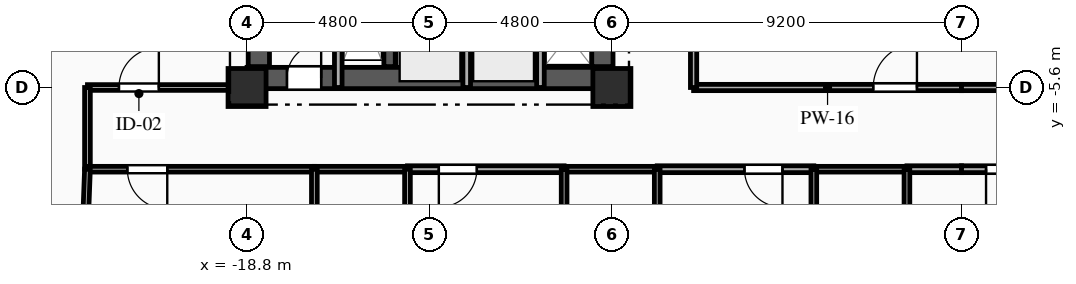
"""IFC4 building model, lengths in metres.
Left out: names, types, materials, properties, quantities, classifications, styles, units other than length and angle.
Written with IfcOpenShell. Run it as: python <this file> out.ifc"""

import sys

from ifc_helpers import new_model, si_unit, direction, frame, frame_2d, origin, origin_2d, place, context, subcontext, project, spatial, rectangle, extrude, element, fill, save


model = new_model("IFC4")
c1 = context("Model", 3, precision=1e-05, world=origin(), true_north=direction((0.0, 1.0)))
c2 = subcontext(c1, "Body", "Model", "MODEL_VIEW")
j1 = project(units=[si_unit("LENGTHUNIT", "METRE"), si_unit("PLANEANGLEUNIT", "RADIAN")], contexts=[c1])
p1 = place(None, origin())
s1 = spatial("IfcSite", under=j1, at=p1, CompositionType="ELEMENT")
p2 = place(p1, origin())
s2 = spatial("IfcBuilding", under=s1, at=p2, CompositionType="ELEMENT")
p3 = place(p2, frame((0.0, 0.0, 122.55)))
s3 = spatial("IfcBuildingStorey", under=s2, at=p3, CompositionType="ELEMENT", Elevation=122.55)
for number, where, z_axis, x_axis in (
    (1, (-18.8, -5.6, 0.0), (0.0, 0.0, 1.0), (1.0, 0.0, 0.0)),
    (2, (-9.2, -5.6, 0.0), (0.0, 0.0, 1.0), (1.0, 0.0, 0.0)),
):
    element("IfcColumn", number, at=place(p3, frame(where, z_axis=z_axis, x_axis=x_axis)), inside=s3, PredefinedType="COLUMN", context=c2, shape_type="SweptSolid", body=[
        extrude(rectangle(XDim=1.0, YDim=1.0, at=origin_2d()), origin(), (0.0, 0.0, 1.0), 3.35),
    ])
p4 = place(p3, frame((-18.8, -5.35, 0.0), z_axis=(0.0, 0.0, 1.0), x_axis=(1.0, 0.0, 0.0)))
e3 = element("IfcWall", 3, at=p4, inside=s3, PredefinedType="SHEAR", context=c2, shape_type="SweptSolid", body=[
    extrude(rectangle(XDim=9.6, YDim=0.56, at=frame_2d((4.8, 0.0))), origin(), (0.0, 0.0, 1.0), 3.0),
])
p5 = place(p4, frame((1.05, 0.0, 0.0)))
e4 = element("IfcOpeningElement", 4, at=p5, cuts=e3, PredefinedType="OPENING", context=c2, shape_type="SweptSolid", body=[
    extrude(rectangle(XDim=0.9, YDim=2.1, at=frame_2d((0.45, 1.05))), frame((0.0, 0.29, 0.0), z_axis=(0.0, -1.0, 0.0), x_axis=(1.0, 0.0, 0.0)), (0.0, 0.0, 1.0), 0.58),
])
p6 = place(p3, frame((-18.49, -5.05, 0.0), z_axis=(0.0, 0.0, 1.0), x_axis=(0.0, 1.0, 0.0)))
e5 = element("IfcWall", 5, at=p6, inside=s3, PredefinedType="SHEAR", context=c2, shape_type="SweptSolid", body=[
    extrude(rectangle(XDim=10.1, YDim=0.56, at=frame_2d((5.05, 0.0))), origin(), (0.0, 0.0, 1.0), 3.0),
])
p7 = place(p3, frame((-9.45, -5.05, 0.0), z_axis=(0.0, 0.0, 1.0), x_axis=(0.0, 1.0, 0.0)))
e6 = element("IfcWall", 6, at=p7, inside=s3, PredefinedType="SHEAR", context=c2, shape_type="SweptSolid", body=[
    extrude(rectangle(XDim=10.1, YDim=0.56, at=frame_2d((5.05, 0.0))), origin(), (0.0, 0.0, 1.0), 3.0),
])
p8 = place(p7, frame((7.175, 0.0, 0.0)))
e7 = element("IfcOpeningElement", 7, at=p8, cuts=e6, PredefinedType="OPENING", context=c2, shape_type="SweptSolid", body=[
    extrude(rectangle(XDim=0.9, YDim=2.1, at=frame_2d((0.45, 1.05))), frame((0.0, 0.29, 0.0), z_axis=(0.0, -1.0, 0.0), x_axis=(1.0, 0.0, 0.0)), (0.0, 0.0, 1.0), 0.58),
])
p9 = place(p7, frame((2.4, 0.0, 0.0)))
e8 = element("IfcOpeningElement", 8, at=p9, cuts=e6, PredefinedType="OPENING", context=c2, shape_type="SweptSolid", body=[
    extrude(rectangle(XDim=1.2, YDim=2.15, at=frame_2d((0.6, 1.075))), frame((0.0, 0.29, 0.0), z_axis=(0.0, -1.0, 0.0), x_axis=(1.0, 0.0, 0.0)), (0.0, 0.0, 1.0), 0.58),
])
p10 = place(p3, frame((-15.05, -5.05, 0.0), z_axis=(0.0, 0.0, 1.0), x_axis=(0.0, 1.0, 0.0)))
e9 = element("IfcWall", 9, at=p10, inside=s3, PredefinedType="SHEAR", context=c2, shape_type="SweptSolid", body=[
    extrude(rectangle(XDim=10.1, YDim=0.3, at=frame_2d((5.05, 0.0))), origin(), (0.0, 0.0, 1.0), 3.0),
])
p11 = place(p3, frame((-16.4, -5.6, 0.0), z_axis=(0.0, 0.0, 1.0), x_axis=(0.0, 1.0, 0.0)))
e10 = element("IfcWall", 10, at=p11, inside=s3, PredefinedType="PARTITIONING", context=c2, shape_type="SweptSolid", body=[
    extrude(rectangle(XDim=3.49, YDim=0.2, at=frame_2d((1.745, 0.0))), origin(), (0.0, 0.0, 1.0), 3.0),
])
for number, where, z_axis, x_axis in (
    (11, (-13.02, -5.6, 0.0), (0.0, 0.0, 1.0), (0.0, 1.0, 0.0)),
    (12, (-11.08, -5.6, 0.0), (0.0, 0.0, 1.0), (0.0, 1.0, 0.0)),
):
    element("IfcWall", number, at=place(p3, frame(where, z_axis=z_axis, x_axis=x_axis)), inside=s3, PredefinedType="PARTITIONING", context=c2, shape_type="SweptSolid", body=[
        extrude(rectangle(XDim=2.25, YDim=0.2, at=frame_2d((1.125, 0.0))), origin(), (0.0, 0.0, 1.0), 3.0),
    ])
p12 = place(p3, frame((-23.0, -5.6, 0.0), z_axis=(0.0, 0.0, 1.0), x_axis=(1.0, 0.0, 0.0)))
e13 = element("IfcWall", 13, at=p12, inside=s3, PredefinedType="PARTITIONING", context=c2, shape_type="SweptSolid", body=[
    extrude(rectangle(XDim=4.2, YDim=0.15, at=frame_2d((2.1, 0.0))), origin(), (0.0, 0.0, 1.0), 3.0),
])
p13 = place(p12, frame((0.829, 0.0, 0.0)))
e14 = element("IfcOpeningElement", 14, at=p13, cuts=e13, PredefinedType="OPENING", context=c2, shape_type="SweptSolid", body=[
    extrude(rectangle(XDim=1.05, YDim=2.15, at=frame_2d((0.525, 1.075))), frame((0.0, 0.085, 0.0), z_axis=(0.0, -1.0, 0.0), x_axis=(1.0, 0.0, 0.0)), (0.0, 0.0, 1.0), 0.17),
])
p14 = place(p3, frame((-23.0, -7.75, 0.0), z_axis=(0.0, 0.0, 1.0), x_axis=(0.0, 1.0, 0.0)))
e15 = element("IfcWall", 15, at=p14, inside=s3, PredefinedType="PARTITIONING", context=c2, shape_type="SweptSolid", body=[
    extrude(rectangle(XDim=2.15, YDim=0.15, at=frame_2d((1.075, 0.0))), origin(), (0.0, 0.0, 1.0), 2.655),
])
p15 = place(p3, frame((-17.029, -7.75, 0.0), z_axis=(0.0, 0.0, 1.0), x_axis=(-1.0, 0.0, 0.0)))
e16 = element("IfcWall", 16, at=p15, inside=s3, PredefinedType="PARTITIONING", context=c2, shape_type="SweptSolid", body=[
    extrude(rectangle(XDim=5.971, YDim=0.15, at=frame_2d((2.985, 0.0))), origin(), (0.0, 0.0, 1.0), 3.0),
])
p16 = place(p15, frame((3.871, 0.0, 0.0)))
e17 = element("IfcOpeningElement", 17, at=p16, cuts=e16, PredefinedType="OPENING", context=c2, shape_type="SweptSolid", body=[
    extrude(rectangle(XDim=1.05, YDim=2.15, at=frame_2d((0.525, 1.075))), frame((0.0, 0.085, 0.0), z_axis=(0.0, -1.0, 0.0), x_axis=(1.0, 0.0, 0.0)), (0.0, 0.0, 1.0), 0.17),
])
p17 = place(p3, frame((-10.457, -7.75, 0.0), z_axis=(0.0, 0.0, 1.0), x_axis=(-1.0, 0.0, 0.0)))
e18 = element("IfcWall", 18, at=p17, inside=s3, PredefinedType="PARTITIONING", context=c2, shape_type="SweptSolid", body=[
    extrude(rectangle(XDim=4.122, YDim=0.18, at=frame_2d((2.061, 0.0))), origin(), (0.0, 0.0, 1.0), 3.0),
])
p18 = place(p17, frame((2.297, 0.0, 0.0)))
e19 = element("IfcOpeningElement", 19, at=p18, cuts=e18, PredefinedType="OPENING", context=c2, shape_type="SweptSolid", body=[
    extrude(rectangle(XDim=1.0, YDim=2.15, at=frame_2d((0.5, 1.075))), frame((0.0, 0.1, 0.0), z_axis=(0.0, -1.0, 0.0), x_axis=(1.0, 0.0, 0.0)), (0.0, 0.0, 1.0), 0.2),
])
p19 = place(p3, frame((-14.579, -7.75, 0.0), z_axis=(0.0, 0.0, 1.0), x_axis=(-1.0, 0.0, 0.0)))
e20 = element("IfcWall", 20, at=p19, inside=s3, PredefinedType="PLUMBINGWALL", context=c2, shape_type="SweptSolid", body=[
    extrude(rectangle(XDim=2.45, YDim=0.15, at=frame_2d((1.225, 0.0))), origin(), (0.0, 0.0, 1.0), 3.0),
])
p20 = place(p3, frame((-3.886, -7.75, 0.0), z_axis=(0.0, 0.0, 1.0), x_axis=(-1.0, 0.0, 0.0)))
e21 = element("IfcWall", 21, at=p20, inside=s3, PredefinedType="PARTITIONING", context=c2, shape_type="SweptSolid", body=[
    extrude(rectangle(XDim=4.121, YDim=0.18, at=frame_2d((2.061, 0.0))), origin(), (0.0, 0.0, 1.0), 3.0),
])
p21 = place(p20, frame((0.825, 0.0, 0.0)))
e22 = element("IfcOpeningElement", 22, at=p21, cuts=e21, PredefinedType="OPENING", context=c2, shape_type="SweptSolid", body=[
    extrude(rectangle(XDim=1.0, YDim=2.15, at=frame_2d((0.5, 1.075))), frame((0.0, 0.1, 0.0), z_axis=(0.0, -1.0, 0.0), x_axis=(1.0, 0.0, 0.0)), (0.0, 0.0, 1.0), 0.2),
])
p22 = place(p3, frame((-8.007, -7.75, 0.0), z_axis=(0.0, 0.0, 1.0), x_axis=(-1.0, 0.0, 0.0)))
e23 = element("IfcWall", 23, at=p22, inside=s3, PredefinedType="PLUMBINGWALL", context=c2, shape_type="SweptSolid", body=[
    extrude(rectangle(XDim=2.45, YDim=0.15, at=frame_2d((1.225, 0.0))), origin(), (0.0, 0.0, 1.0), 3.0),
])
p23 = place(p3, frame((0.0, -7.75, 0.0), z_axis=(0.0, 0.0, 1.0), x_axis=(-1.0, 0.0, 0.0)))
e24 = element("IfcWall", 24, at=p23, inside=s3, PredefinedType="PARTITIONING", context=c2, shape_type="SweptSolid", body=[
    extrude(rectangle(XDim=1.436, YDim=0.18, at=frame_2d((0.718, 0.0))), origin(), (0.0, 0.0, 1.0), 3.0),
])
p24 = place(p3, frame((-1.436, -7.75, 0.0), z_axis=(0.0, 0.0, 1.0), x_axis=(-1.0, 0.0, 0.0)))
e25 = element("IfcWall", 25, at=p24, inside=s3, PredefinedType="PLUMBINGWALL", context=c2, shape_type="SweptSolid", body=[
    extrude(rectangle(XDim=2.45, YDim=0.15, at=frame_2d((1.225, 0.0))), origin(), (0.0, 0.0, 1.0), 3.0),
])
p25 = place(p3, frame((-7.05, -5.6, 0.0), z_axis=(0.0, 0.0, 1.0), x_axis=(1.0, 0.0, 0.0)))
e26 = element("IfcWall", 26, at=p25, inside=s3, PredefinedType="PARTITIONING", context=c2, shape_type="SweptSolid", body=[
    extrude(rectangle(XDim=7.05, YDim=0.165, at=frame_2d((3.525, 0.0))), origin(), (0.0, 0.0, 1.0), 2.485),
])
p26 = place(p25, frame((4.728, 0.0, 0.0)))
e27 = element("IfcOpeningElement", 27, at=p26, cuts=e26, PredefinedType="OPENING", context=c2, shape_type="SweptSolid", body=[
    extrude(rectangle(XDim=1.15, YDim=2.15, at=frame_2d((0.575, 1.075))), frame((0.0, 0.093, 0.0), z_axis=(0.0, -1.0, 0.0), x_axis=(1.0, 0.0, 0.0)), (0.0, 0.0, 1.0), 0.185),
])
p27 = place(p3, frame((2.686, -7.75, 0.0), z_axis=(0.0, 0.0, 1.0), x_axis=(-1.0, 0.0, 0.0)))
e28 = element("IfcWall", 28, at=p27, inside=s3, PredefinedType="PARTITIONING", context=c2, shape_type="SweptSolid", body=[
    extrude(rectangle(XDim=2.686, YDim=0.18, at=frame_2d((1.343, 0.0))), origin(), (0.0, 0.0, 1.0), 3.0),
])
p28 = place(p27, frame((1.04, 0.0, 0.0)))
e29 = element("IfcOpeningElement", 29, at=p28, cuts=e28, PredefinedType="OPENING", context=c2, shape_type="SweptSolid", body=[
    extrude(rectangle(XDim=1.0, YDim=2.15, at=frame_2d((0.5, 1.075))), frame((0.0, 0.1, 0.0), z_axis=(0.0, -1.0, 0.0), x_axis=(1.0, 0.0, 0.0)), (0.0, 0.0, 1.0), 0.2),
])
p29 = place(p3, frame((0.0, -5.6, 0.0), z_axis=(0.0, 0.0, 1.0), x_axis=(1.0, 0.0, 0.0)))
e30 = element("IfcWall", 30, at=p29, inside=s3, PredefinedType="PARTITIONING", context=c2, shape_type="SweptSolid", body=[
    extrude(rectangle(XDim=7.05, YDim=0.165, at=frame_2d((3.525, 0.0))), origin(), (0.0, 0.0, 1.0), 2.485),
])
p30 = place(p3, frame((-7.05, 1.45, 0.0), z_axis=(0.0, 0.0, 1.0), x_axis=(0.0, -1.0, 0.0)))
e31 = element("IfcWall", 31, at=p30, inside=s3, PredefinedType="PARTITIONING", context=c2, shape_type="SweptSolid", body=[
    extrude(rectangle(XDim=7.05, YDim=0.165, at=frame_2d((3.525, 0.0))), origin(), (0.0, 0.0, 1.0), 3.0),
])
p31 = place(p3, frame((-23.0, -7.75, 0.0), z_axis=(0.0, 0.0, 1.0), x_axis=(-0.036924695214, -0.999318050914, 0.0)))
e32 = element("IfcWall", 32, at=p31, inside=s3, PredefinedType="PARTITIONING", context=c2, shape_type="SweptSolid", body=[
    extrude(rectangle(XDim=10.176, YDim=0.15, at=frame_2d((5.088, 0.0))), origin(), (0.0, 0.0, 1.0), 3.0),
])
for number, where, z_axis, x_axis in (
    (33, (-17.029, -7.75, 0.0), (0.0, 0.0, 1.0), (0.0, -1.0, 0.0)),
    (34, (-14.579, -9.9, 0.0), (0.0, 0.0, 1.0), (0.0, 1.0, 0.0)),
    (35, (-10.457, -7.75, 0.0), (0.0, 0.0, 1.0), (0.0, -1.0, 0.0)),
    (36, (-8.007, -9.9, 0.0), (0.0, 0.0, 1.0), (0.0, 1.0, 0.0)),
    (37, (-3.886, -7.75, 0.0), (0.0, 0.0, 1.0), (0.0, -1.0, 0.0)),
    (38, (-1.436, -9.9, 0.0), (0.0, 0.0, 1.0), (0.0, 1.0, 0.0)),
):
    element("IfcWall", number, at=place(p3, frame(where, z_axis=z_axis, x_axis=x_axis)), inside=s3, PredefinedType="PLUMBINGWALL", context=c2, shape_type="SweptSolid", body=[
        extrude(rectangle(XDim=2.15, YDim=0.15, at=frame_2d((1.075, 0.0))), origin(), (0.0, 0.0, 1.0), 3.0),
    ])
p32 = place(p5, origin())
e39 = element("IfcDoor", 39, at=p32, inside=s3, OperationType="SINGLE_SWING_RIGHT", PredefinedType="DOOR", context=c2, shape_type="SweptSolid", body=[
    extrude(rectangle(XDim=0.9, YDim=2.1, at=frame_2d((0.45, 1.05))), frame((0.0, 0.025, 0.0), z_axis=(0.0, -1.0, 0.0), x_axis=(1.0, 0.0, 0.0)), (0.0, 0.0, 1.0), 0.05),
])
fill(e4, e39)
p33 = place(p13, origin())
e40 = element("IfcDoor", 40, at=p33, inside=s3, OperationType="SINGLE_SWING_RIGHT", PredefinedType="DOOR", context=c2, shape_type="SweptSolid", body=[
    extrude(rectangle(XDim=1.05, YDim=2.15, at=frame_2d((0.525, 1.075))), frame((0.0, 0.025, 0.0), z_axis=(0.0, -1.0, 0.0), x_axis=(1.0, 0.0, 0.0)), (0.0, 0.0, 1.0), 0.05),
])
fill(e14, e40)
p34 = place(p16, origin())
e41 = element("IfcDoor", 41, at=p34, inside=s3, OperationType="SINGLE_SWING_LEFT", PredefinedType="DOOR", context=c2, shape_type="SweptSolid", body=[
    extrude(rectangle(XDim=1.05, YDim=2.15, at=frame_2d((0.525, 1.075))), frame((0.0, 0.025, 0.0), z_axis=(0.0, -1.0, 0.0), x_axis=(1.0, 0.0, 0.0)), (0.0, 0.0, 1.0), 0.05),
])
fill(e17, e41)
p35 = place(p18, origin())
e42 = element("IfcDoor", 42, at=p35, inside=s3, OperationType="SINGLE_SWING_RIGHT", PredefinedType="DOOR", context=c2, shape_type="SweptSolid", body=[
    extrude(rectangle(XDim=1.0, YDim=2.15, at=frame_2d((0.5, 1.075))), frame((0.0, 0.025, 0.0), z_axis=(0.0, -1.0, 0.0), x_axis=(1.0, 0.0, 0.0)), (0.0, 0.0, 1.0), 0.05),
])
fill(e19, e42)
p36 = place(p21, origin())
e43 = element("IfcDoor", 43, at=p36, inside=s3, OperationType="SINGLE_SWING_LEFT", PredefinedType="DOOR", context=c2, shape_type="SweptSolid", body=[
    extrude(rectangle(XDim=1.0, YDim=2.15, at=frame_2d((0.5, 1.075))), frame((0.0, 0.025, 0.0), z_axis=(0.0, -1.0, 0.0), x_axis=(1.0, 0.0, 0.0)), (0.0, 0.0, 1.0), 0.05),
])
fill(e22, e43)
p37 = place(p26, origin())
e44 = element("IfcDoor", 44, at=p37, inside=s3, OperationType="SINGLE_SWING_RIGHT", PredefinedType="DOOR", context=c2, shape_type="SweptSolid", body=[
    extrude(rectangle(XDim=1.15, YDim=2.15, at=frame_2d((0.575, 1.075))), frame((0.0, 0.025, 0.0), z_axis=(0.0, -1.0, 0.0), x_axis=(1.0, 0.0, 0.0)), (0.0, 0.0, 1.0), 0.05),
])
fill(e27, e44)
p38 = place(p28, origin())
e45 = element("IfcDoor", 45, at=p38, inside=s3, OperationType="SINGLE_SWING_RIGHT", PredefinedType="DOOR", context=c2, shape_type="SweptSolid", body=[
    extrude(rectangle(XDim=1.0, YDim=2.15, at=frame_2d((0.5, 1.075))), frame((0.0, 0.025, 0.0), z_axis=(0.0, -1.0, 0.0), x_axis=(1.0, 0.0, 0.0)), (0.0, 0.0, 1.0), 0.05),
])
fill(e29, e45)
save(model, sys.argv[1])
